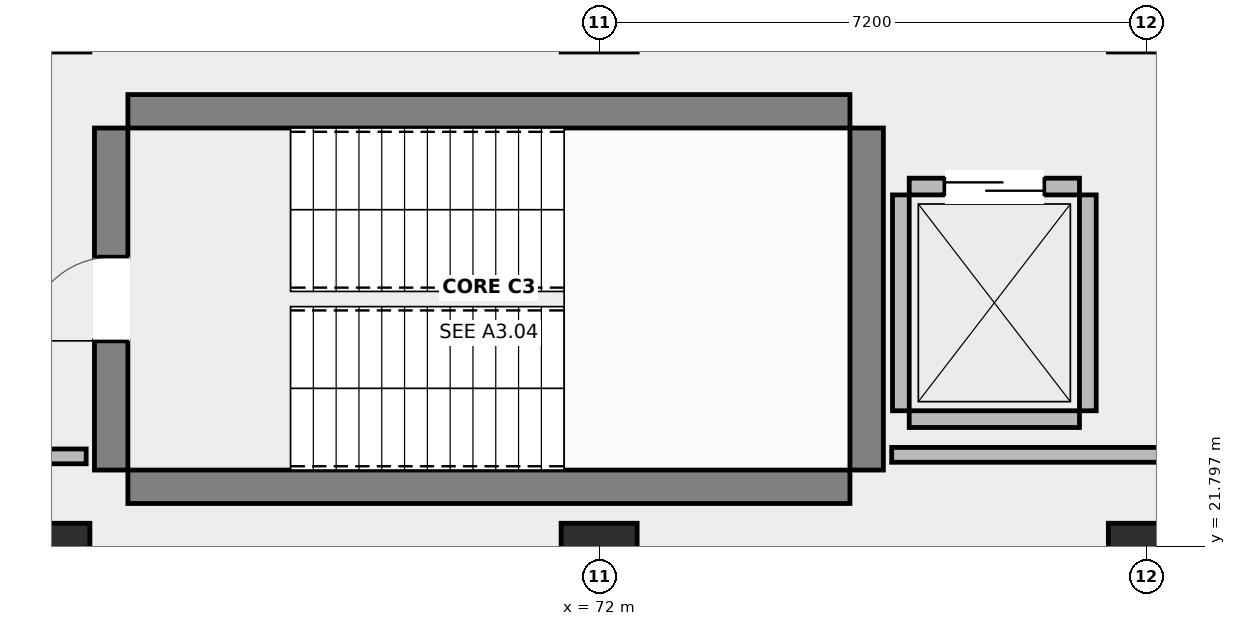
"""IFC4 building model, lengths in metres.
Left out: names, types, materials, properties, quantities, classifications, styles, units other than length and angle.
Written with IfcOpenShell. Run it as: python <this file> out.ifc"""

import sys

from ifc_helpers import new_model, si_unit, direction, frame, frame_2d, origin, origin_2d, place, context, subcontext, project, spatial, rectangle, extrude, element, fill, save


model = new_model("IFC4")
c1 = context("Model", 3, precision=1e-05, world=origin(), true_north=direction((0.0, 1.0)))
c2 = subcontext(c1, "Body", "Model", "MODEL_VIEW")
j1 = project(units=[si_unit("LENGTHUNIT", "METRE"), si_unit("PLANEANGLEUNIT", "RADIAN")], contexts=[c1])
p1 = place(None, origin())
s1 = spatial("IfcSite", under=j1, at=p1, CompositionType="ELEMENT")
p2 = place(p1, origin())
s2 = spatial("IfcBuilding", under=s1, at=p2, CompositionType="ELEMENT")
p3 = place(p2, frame((0.0, 0.0, -4.5)))
s3 = spatial("IfcBuildingStorey", under=s2, at=p3, CompositionType="ELEMENT", Elevation=-4.5)
for number, where, z_axis, x_axis in (
    (1, (64.8, 21.6, 0.0), (0.0, 0.0, 1.0), (1.0, 0.0, 0.0)),
    (2, (72.0, 21.6, 0.0), (0.0, 0.0, 1.0), (1.0, 0.0, 0.0)),
    (3, (79.2, 21.6, 0.0), (0.0, 0.0, 1.0), (1.0, 0.0, 0.0)),
):
    element("IfcColumn", number, at=place(p3, frame(where, z_axis=z_axis, x_axis=x_axis)), inside=s3, PredefinedType="COLUMN", context=c2, shape_type="SweptSolid", body=[
        extrude(rectangle(XDim=1.0, YDim=1.0, at=origin_2d()), origin(), (0.0, 0.0, 1.0), 4.15),
    ])
for number, where, z_axis, x_axis in (
    (4, (65.8, 22.58, 0.0), (0.0, 0.0, 1.0), (1.0, 0.0, 0.0)),
    (5, (65.8, 27.52, 0.0), (0.0, 0.0, 1.0), (1.0, 0.0, 0.0)),
):
    element("IfcWall", number, at=place(p3, frame(where, z_axis=z_axis, x_axis=x_axis)), inside=s3, PredefinedType="SHEAR", context=c2, shape_type="SweptSolid", body=[
        extrude(rectangle(XDim=9.5, YDim=0.44, at=frame_2d((4.75, 0.0))), origin(), (0.0, 0.0, 1.0), 4.15),
    ])
p4 = place(p3, frame((65.58, 22.8, 0.0), z_axis=(0.0, 0.0, 1.0), x_axis=(0.0, 1.0, 0.0)))
e6 = element("IfcWall", 6, at=p4, inside=s3, PredefinedType="SHEAR", context=c2, shape_type="SweptSolid", body=[
    extrude(rectangle(XDim=4.5, YDim=0.44, at=frame_2d((2.25, 0.0))), origin(), (0.0, 0.0, 1.0), 4.15),
])
p5 = place(p4, frame((1.7, 0.0, 0.0)))
e7 = element("IfcOpeningElement", 7, at=p5, cuts=e6, PredefinedType="OPENING", context=c2, shape_type="SweptSolid", body=[
    extrude(rectangle(XDim=1.1, YDim=2.15, at=frame_2d((0.55, 1.075))), frame((0.0, 0.23, 0.0), z_axis=(0.0, -1.0, 0.0), x_axis=(1.0, 0.0, 0.0)), (0.0, 0.0, 1.0), 0.46),
])
p6 = place(p3, frame((75.52, 22.8, 0.0), z_axis=(0.0, 0.0, 1.0), x_axis=(0.0, 1.0, 0.0)))
e8 = element("IfcWall", 8, at=p6, inside=s3, PredefinedType="SHEAR", context=c2, shape_type="SweptSolid", body=[
    extrude(rectangle(XDim=4.5, YDim=0.44, at=frame_2d((2.25, 0.0))), origin(), (0.0, 0.0, 1.0), 4.15),
])
p7 = place(p3, frame((76.08, 23.47, 0.0), z_axis=(0.0, 0.0, 1.0), x_axis=(1.0, 0.0, 0.0)))
e9 = element("IfcWall", 9, at=p7, inside=s3, PredefinedType="STANDARD", context=c2, shape_type="SweptSolid", body=[
    extrude(rectangle(XDim=2.24, YDim=0.22, at=frame_2d((1.12, 0.0))), origin(), (0.0, 0.0, 1.0), 3.19),
])
p8 = place(p3, frame((76.08, 26.53, 0.0), z_axis=(0.0, 0.0, 1.0), x_axis=(1.0, 0.0, 0.0)))
e10 = element("IfcWall", 10, at=p8, inside=s3, PredefinedType="STANDARD", context=c2, shape_type="SweptSolid", body=[
    extrude(rectangle(XDim=2.24, YDim=0.22, at=frame_2d((1.12, 0.0))), origin(), (0.0, 0.0, 1.0), 3.19),
])
p9 = place(p8, frame((0.47, 0.0, 0.0)))
e11 = element("IfcOpeningElement", 11, at=p9, cuts=e10, PredefinedType="OPENING", context=c2, shape_type="SweptSolid", body=[
    extrude(rectangle(XDim=1.3, YDim=2.2, at=frame_2d((0.65, 1.1))), frame((0.0, 0.12, 0.0), z_axis=(0.0, -1.0, 0.0), x_axis=(1.0, 0.0, 0.0)), (0.0, 0.0, 1.0), 0.24),
])
for number, where, z_axis, x_axis in (
    (12, (75.97, 23.58, 0.0), (0.0, 0.0, 1.0), (0.0, 1.0, 0.0)),
    (13, (78.43, 23.58, 0.0), (0.0, 0.0, 1.0), (0.0, 1.0, 0.0)),
):
    element("IfcWall", number, at=place(p3, frame(where, z_axis=z_axis, x_axis=x_axis)), inside=s3, PredefinedType="STANDARD", context=c2, shape_type="SweptSolid", body=[
        extrude(rectangle(XDim=2.84, YDim=0.22, at=frame_2d((1.42, 0.0))), origin(), (0.0, 0.0, 1.0), 3.19),
    ])
p10 = place(p3, frame((61.089, 22.98, 0.0), z_axis=(0.0, 0.0, 1.0), x_axis=(1.0, 0.0, 0.0)))
e14 = element("IfcWall", 14, at=p10, inside=s3, PredefinedType="PARTITIONING", context=c2, shape_type="SweptSolid", body=[
    extrude(rectangle(XDim=4.162, YDim=0.195, at=frame_2d((2.081, 0.0))), origin(), (0.0, 0.0, 1.0), 3.19),
])
p11 = place(p10, frame((1.256, 0.0, 0.0)))
e15 = element("IfcOpeningElement", 15, at=p11, cuts=e14, PredefinedType="OPENING", context=c2, shape_type="SweptSolid", body=[
    extrude(rectangle(XDim=1.65, YDim=2.2, at=frame_2d((0.825, 1.1))), frame((0.0, 0.107, 0.0), z_axis=(0.0, -1.0, 0.0), x_axis=(1.0, 0.0, 0.0)), (0.0, 0.0, 1.0), 0.215),
])
p12 = place(p3, frame((75.849, 23.0, 0.0), z_axis=(0.0, 0.0, 1.0), x_axis=(1.0, 0.0, 0.0)))
e16 = element("IfcWall", 16, at=p12, inside=s3, PredefinedType="PARTITIONING", context=c2, shape_type="SweptSolid", body=[
    extrude(rectangle(XDim=13.931, YDim=0.195, at=frame_2d((6.965, 0.0))), origin(), (0.0, 0.0, 1.0), 3.19),
])
p13 = place(p5, origin())
e17 = element("IfcDoor", 17, at=p13, inside=s3, OperationType="SINGLE_SWING_LEFT", PredefinedType="DOOR", context=c2, shape_type="SweptSolid", body=[
    extrude(rectangle(XDim=1.1, YDim=2.15, at=frame_2d((0.55, 1.075))), frame((0.0, 0.025, 0.0), z_axis=(0.0, -1.0, 0.0), x_axis=(1.0, 0.0, 0.0)), (0.0, 0.0, 1.0), 0.05),
])
fill(e7, e17)
p14 = place(p9, origin())
e18 = element("IfcDoor", 18, at=p14, inside=s3, OperationType="SLIDING_TO_LEFT", PredefinedType="DOOR", context=c2, shape_type="SweptSolid", body=[
    extrude(rectangle(XDim=1.3, YDim=2.2, at=frame_2d((0.65, 1.1))), frame((0.0, 0.025, 0.0), z_axis=(0.0, -1.0, 0.0), x_axis=(1.0, 0.0, 0.0)), (0.0, 0.0, 1.0), 0.05),
])
fill(e11, e18)
save(model, sys.argv[1])
